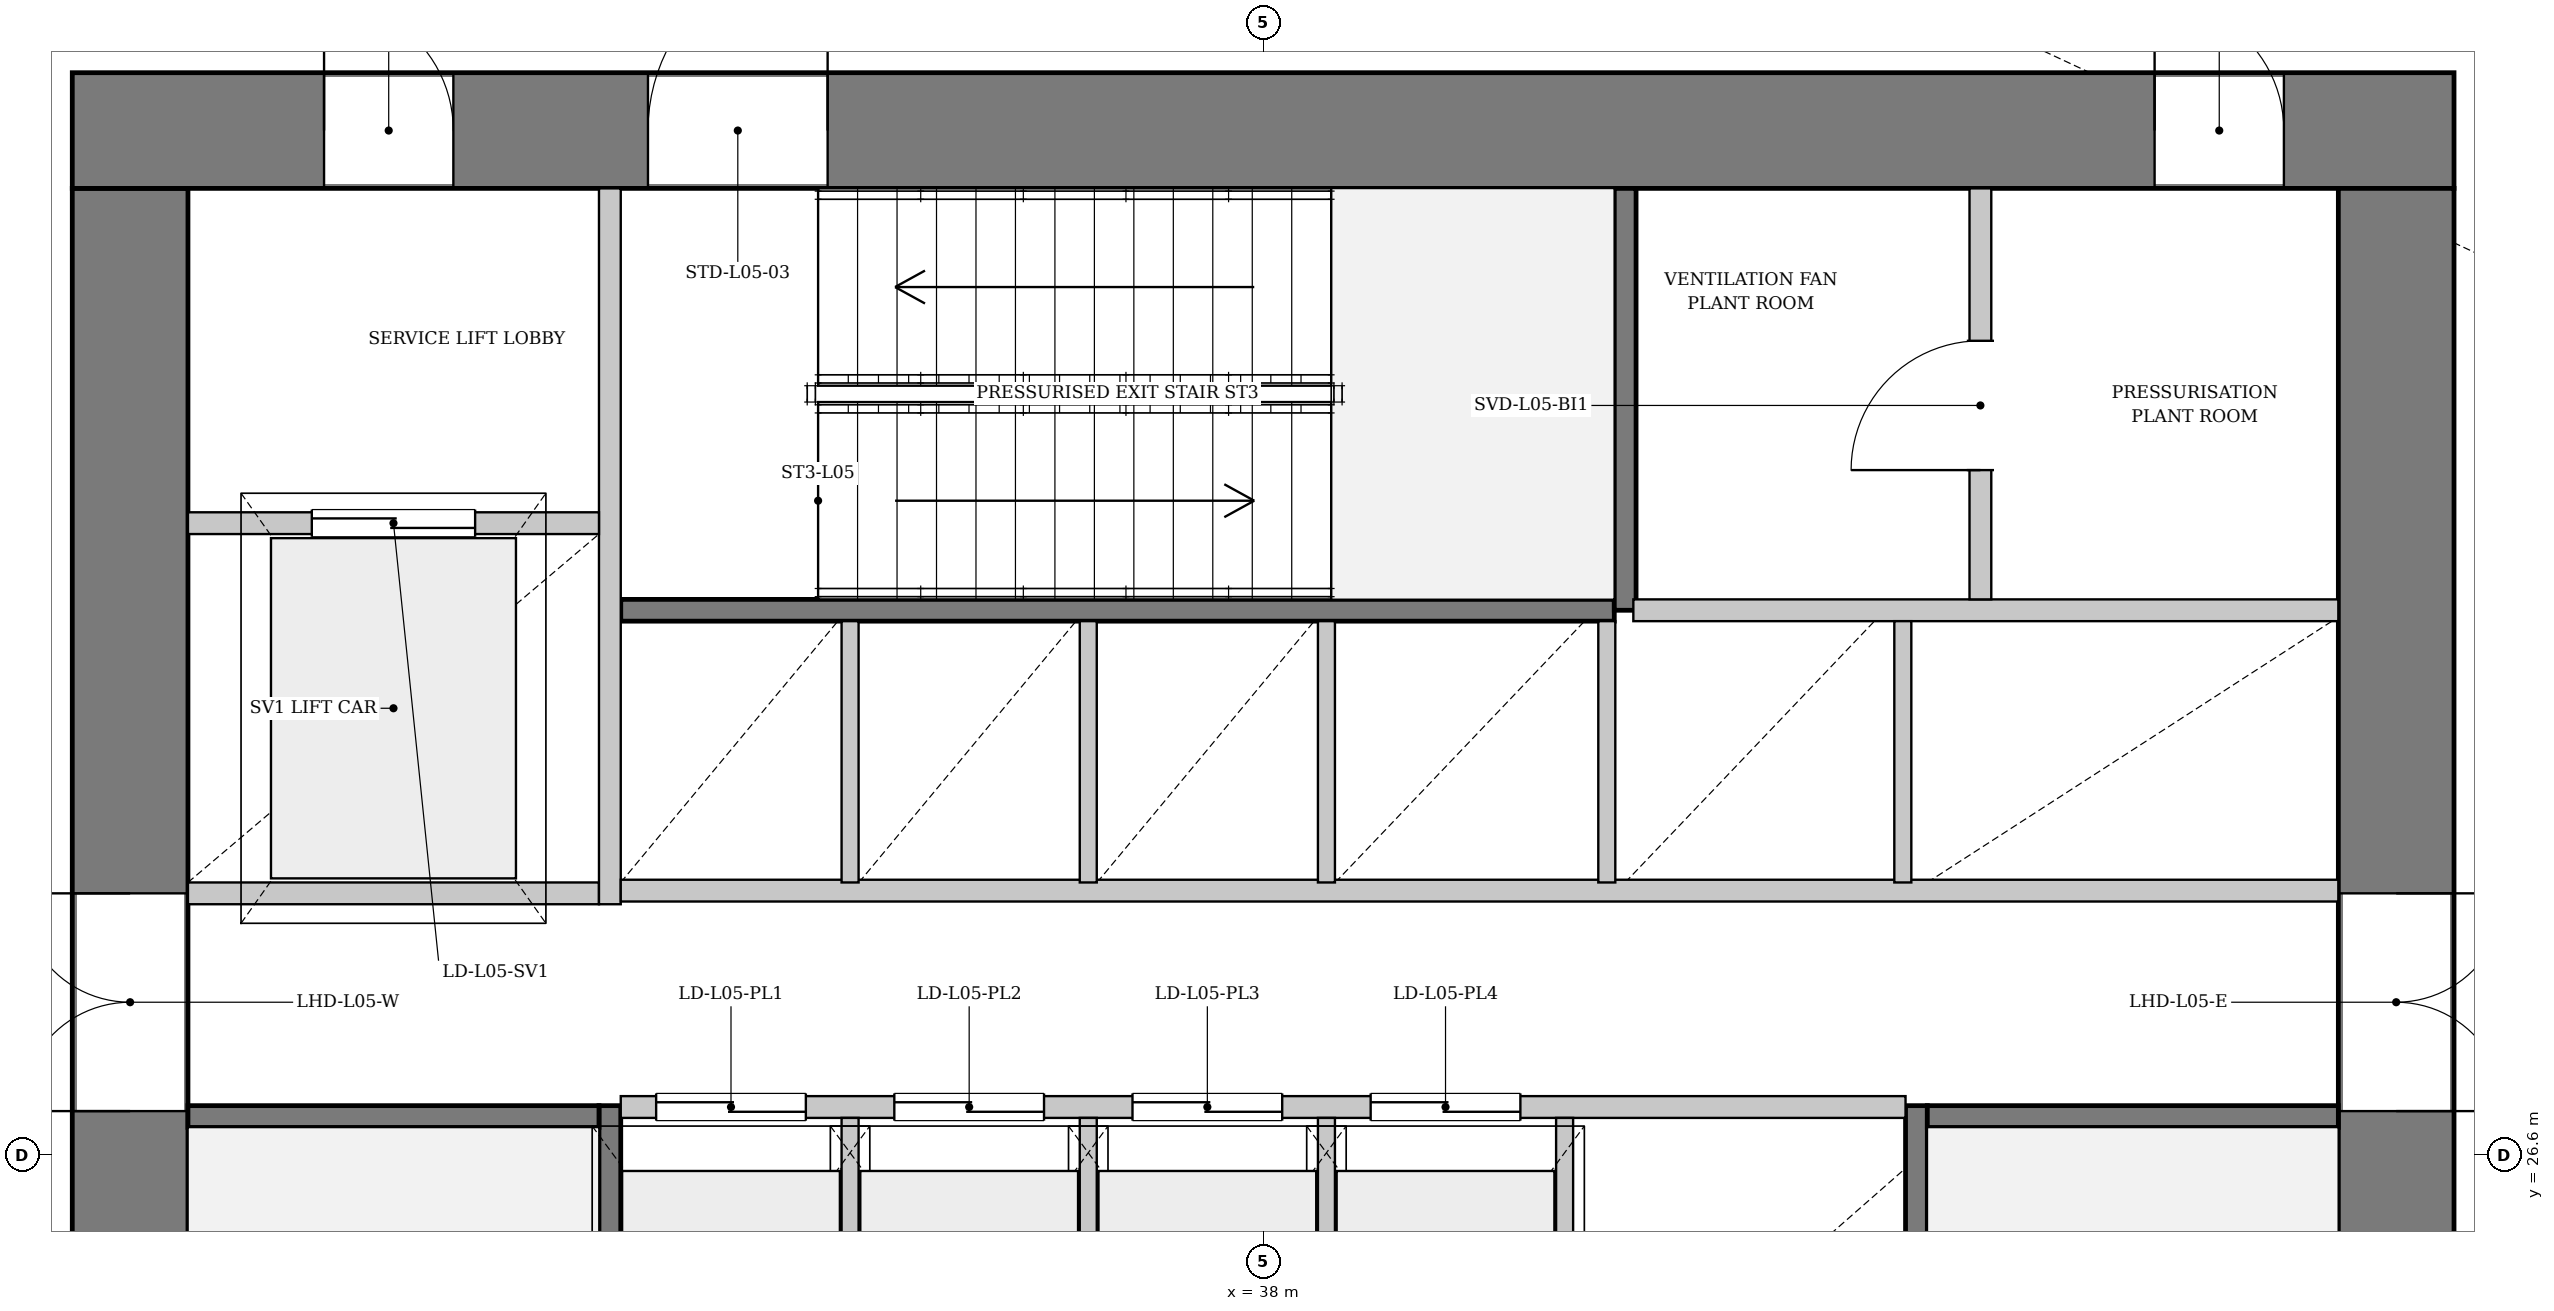
"""IFC4 building model, lengths in metres.
Left out: names, types, materials, properties, quantities, classifications, styles, units other than length and angle.
Written with IfcOpenShell. Run it as: python <this file> out.ifc"""

import sys

from ifc_helpers import new_model, si_unit, direction, frame, frame_2d, origin, place, context, subcontext, project, spatial, rectangle, extrude, source, transform, mapped, element, fill, save


model = new_model("IFC4")
c1 = context("Model", 3, precision=1e-05, world=origin(), true_north=direction((0.0, 1.0)))
c2 = subcontext(c1, "Body", "Model", "MODEL_VIEW")
j1 = project(units=[si_unit("LENGTHUNIT", "METRE"), si_unit("PLANEANGLEUNIT", "RADIAN")], contexts=[c1])
p1 = place(None, origin())
s1 = spatial("IfcSite", under=j1, at=p1, CompositionType="ELEMENT")
p2 = place(p1, origin())
s2 = spatial("IfcBuilding", under=s1, at=p2, CompositionType="ELEMENT")
p3 = place(p2, frame((0.0, 0.0, 24.6)))
s3 = spatial("IfcBuildingStorey", under=s2, at=p3, CompositionType="ELEMENT", Elevation=24.6)
p4 = place(p3, frame((29.675, 19.5, 0.0), z_axis=(0.0, 0.0, 1.0), x_axis=(0.0, 1.0, 0.0)))
e1 = element("IfcWall", 1, at=p4, inside=s3, PredefinedType="SHEAR", context=c2, shape_type="SweptSolid", body=[
    extrude(rectangle(XDim=14.2, YDim=0.85, at=frame_2d((7.1, 0.0))), origin(), (0.0, 0.0, 1.0), 4.45),
])
p5 = place(p4, frame((7.42, 0.0, 0.0)))
e2 = element("IfcOpeningElement", 2, at=p5, cuts=e1, PredefinedType="OPENING", context=c2, shape_type="SweptSolid", body=[
    extrude(rectangle(XDim=1.6, YDim=2.2, at=frame_2d((0.8, 1.1))), frame((0.0, 0.435, 0.0), z_axis=(0.0, -1.0, 0.0), x_axis=(1.0, 0.0, 0.0)), (0.0, 0.0, 1.0), 0.87),
])
p6 = place(p3, frame((29.25, 34.125, 0.0), z_axis=(0.0, 0.0, 1.0), x_axis=(1.0, 0.0, 0.0)))
e3 = element("IfcWall", 3, at=p6, inside=s3, PredefinedType="SHEAR", context=c2, shape_type="SweptSolid", body=[
    extrude(rectangle(XDim=17.5, YDim=0.85, at=frame_2d((8.75, 0.0))), origin(), (0.0, 0.0, 1.0), 4.45),
])
p7 = place(p6, frame((1.85, 0.0, 0.0)))
e4 = element("IfcOpeningElement", 4, at=p7, cuts=e3, PredefinedType="OPENING", context=c2, shape_type="SweptSolid", body=[
    extrude(rectangle(XDim=0.95, YDim=2.1, at=frame_2d((0.475, 1.05))), frame((0.0, 0.435, 0.0), z_axis=(0.0, -1.0, 0.0), x_axis=(1.0, 0.0, 0.0)), (0.0, 0.0, 1.0), 0.87),
])
p8 = place(p6, frame((4.23, 0.0, 0.0)))
e5 = element("IfcOpeningElement", 5, at=p8, cuts=e3, PredefinedType="OPENING", context=c2, shape_type="SweptSolid", body=[
    extrude(rectangle(XDim=1.32, YDim=2.2, at=frame_2d((0.66, 1.1))), frame((0.0, 0.435, 0.0), z_axis=(0.0, -1.0, 0.0), x_axis=(1.0, 0.0, 0.0)), (0.0, 0.0, 1.0), 0.87),
])
p9 = place(p6, frame((15.3, 0.0, 0.0)))
e6 = element("IfcOpeningElement", 6, at=p9, cuts=e3, PredefinedType="OPENING", context=c2, shape_type="SweptSolid", body=[
    extrude(rectangle(XDim=0.95, YDim=2.1, at=frame_2d((0.475, 1.05))), frame((0.0, 0.435, 0.0), z_axis=(0.0, -1.0, 0.0), x_axis=(1.0, 0.0, 0.0)), (0.0, 0.0, 1.0), 0.87),
])
p10 = place(p3, frame((46.325, 33.7, 0.0), z_axis=(0.0, 0.0, 1.0), x_axis=(0.0, -1.0, 0.0)))
e7 = element("IfcWall", 7, at=p10, inside=s3, PredefinedType="SHEAR", context=c2, shape_type="SweptSolid", body=[
    extrude(rectangle(XDim=14.2, YDim=0.85, at=frame_2d((7.1, 0.0))), origin(), (0.0, 0.0, 1.0), 4.45),
])
p11 = place(p10, frame((5.18, 0.0, 0.0)))
e8 = element("IfcOpeningElement", 8, at=p11, cuts=e7, PredefinedType="OPENING", context=c2, shape_type="SweptSolid", body=[
    extrude(rectangle(XDim=1.6, YDim=2.2, at=frame_2d((0.8, 1.1))), frame((0.0, 0.435, 0.0), z_axis=(0.0, -1.0, 0.0), x_axis=(1.0, 0.0, 0.0)), (0.0, 0.0, 1.0), 0.87),
])
p12 = place(p3, frame((33.2, 19.5, 0.0), z_axis=(0.0, 0.0, 1.0), x_axis=(0.0, 1.0, 0.0)))
e9 = element("IfcWall", 9, at=p12, inside=s3, PredefinedType="PARTITIONING", context=c2, shape_type="SweptSolid", body=[
    extrude(rectangle(XDim=7.46, YDim=0.16, at=frame_2d((3.73, 0.0))), origin(), (0.0, 0.0, 1.0), 4.45),
])
p13 = place(p12, frame((0.08, 0.0, 0.0)))
e10 = element("IfcOpeningElement", 10, at=p13, cuts=e9, PredefinedType="OPENING", context=c2, shape_type="SweptSolid", body=[
    extrude(rectangle(XDim=1.32, YDim=2.2, at=frame_2d((0.66, 1.1))), frame((0.0, 0.09, 0.0), z_axis=(0.0, -1.0, 0.0), x_axis=(1.0, 0.0, 0.0)), (0.0, 0.0, 1.0), 0.18),
])
p14 = place(p3, frame((30.1, 26.88, 0.0), z_axis=(0.0, 0.0, 1.0), x_axis=(1.0, 0.0, 0.0)))
e11 = element("IfcWall", 11, at=p14, inside=s3, PredefinedType="PARTITIONING", context=c2, shape_type="SweptSolid", body=[
    extrude(rectangle(XDim=3.02, YDim=0.16, at=frame_2d((1.51, 0.0))), origin(), (0.0, 0.0, 1.0), 4.45),
])
p15 = place(p3, frame((42.8, 26.96, 0.0), z_axis=(0.0, 0.0, 1.0), x_axis=(0.0, -1.0, 0.0)))
e12 = element("IfcWall", 12, at=p15, inside=s3, PredefinedType="PARTITIONING", context=c2, shape_type="SweptSolid", body=[
    extrude(rectangle(XDim=7.46, YDim=0.16, at=frame_2d((3.73, 0.0))), origin(), (0.0, 0.0, 1.0), 4.45),
])
p16 = place(p15, frame((6.06, 0.0, 0.0)))
e13 = element("IfcOpeningElement", 13, at=p16, cuts=e12, PredefinedType="OPENING", context=c2, shape_type="SweptSolid", body=[
    extrude(rectangle(XDim=1.32, YDim=2.2, at=frame_2d((0.66, 1.1))), frame((0.0, 0.09, 0.0), z_axis=(0.0, -1.0, 0.0), x_axis=(1.0, 0.0, 0.0)), (0.0, 0.0, 1.0), 0.18),
])
p17 = place(p3, frame((42.88, 26.88, 0.0), z_axis=(0.0, 0.0, 1.0), x_axis=(1.0, 0.0, 0.0)))
e14 = element("IfcWall", 14, at=p17, inside=s3, PredefinedType="PARTITIONING", context=c2, shape_type="SweptSolid", body=[
    extrude(rectangle(XDim=3.02, YDim=0.16, at=frame_2d((1.51, 0.0))), origin(), (0.0, 0.0, 1.0), 4.45),
])
p18 = place(p3, frame((33.28, 30.6, 0.0), z_axis=(0.0, 0.0, 1.0), x_axis=(1.0, 0.0, 0.0)))
e15 = element("IfcWall", 15, at=p18, inside=s3, PredefinedType="PARTITIONING", context=c2, shape_type="SweptSolid", body=[
    extrude(rectangle(XDim=7.3, YDim=0.16, at=frame_2d((3.65, 0.0))), origin(), (0.0, 0.0, 1.0), 4.45),
])
p19 = place(p3, frame((40.66, 30.6, 0.0), z_axis=(0.0, 0.0, 1.0), x_axis=(0.0, 1.0, 0.0)))
e16 = element("IfcWall", 16, at=p19, inside=s3, PredefinedType="PARTITIONING", context=c2, shape_type="SweptSolid", body=[
    extrude(rectangle(XDim=3.1, YDim=0.16, at=frame_2d((1.55, 0.0))), origin(), (0.0, 0.0, 1.0), 4.45),
])
p20 = place(p3, frame((30.1, 28.52, 0.0), z_axis=(0.0, 0.0, 1.0), x_axis=(1.0, 0.0, 0.0)))
e17 = element("IfcWall", 17, at=p20, inside=s3, PredefinedType="PARTITIONING", context=c2, shape_type="SweptSolid", body=[
    extrude(rectangle(XDim=3.02, YDim=0.16, at=frame_2d((1.51, 0.0))), origin(), (0.0, 0.0, 1.0), 4.45),
])
p21 = place(p3, frame((33.2, 28.44, 0.0), z_axis=(0.0, 0.0, 1.0), x_axis=(0.0, 1.0, 0.0)))
e18 = element("IfcWall", 18, at=p21, inside=s3, PredefinedType="PARTITIONING", context=c2, shape_type="SweptSolid", body=[
    extrude(rectangle(XDim=5.26, YDim=0.16, at=frame_2d((2.63, 0.0))), origin(), (0.0, 0.0, 1.0), 4.45),
])
p22 = place(p3, frame((30.1, 31.24, 0.0), z_axis=(0.0, 0.0, 1.0), x_axis=(1.0, 0.0, 0.0)))
e19 = element("IfcWall", 19, at=p22, inside=s3, PredefinedType="PARTITIONING", context=c2, shape_type="SweptSolid", body=[
    extrude(rectangle(XDim=3.02, YDim=0.16, at=frame_2d((1.51, 0.0))), origin(), (0.0, 0.0, 1.0), 4.45),
])
p23 = place(p22, frame((0.91, 0.0, 0.0)))
e20 = element("IfcOpeningElement", 20, at=p23, cuts=e19, PredefinedType="OPENING", context=c2, shape_type="SweptSolid", body=[
    extrude(rectangle(XDim=1.2, YDim=2.2, at=frame_2d((0.6, 1.1))), frame((0.0, 0.09, 0.0), z_axis=(0.0, -1.0, 0.0), x_axis=(1.0, 0.0, 0.0)), (0.0, 0.0, 1.0), 0.18),
])
p24 = place(p3, frame((33.28, 26.95, 0.0), z_axis=(0.0, 0.0, 1.0), x_axis=(1.0, 0.0, 0.0)))
e21 = element("IfcWall", 21, at=p24, inside=s3, PredefinedType="PARTITIONING", context=c2, shape_type="SweptSolid", body=[
    extrude(rectangle(XDim=9.44, YDim=0.16, at=frame_2d((4.72, 0.0))), origin(), (0.0, 0.0, 1.0), 4.45),
])
p25 = place(p24, frame((0.26, 0.0, 0.0)))
e22 = element("IfcOpeningElement", 22, at=p25, cuts=e21, PredefinedType="OPENING", context=c2, shape_type="SweptSolid", body=[
    extrude(rectangle(XDim=1.1, YDim=2.2, at=frame_2d((0.55, 1.1))), frame((0.0, 0.09, 0.0), z_axis=(0.0, -1.0, 0.0), x_axis=(1.0, 0.0, 0.0)), (0.0, 0.0, 1.0), 0.18),
])
p26 = place(p24, frame((2.01, 0.0, 0.0)))
e23 = element("IfcOpeningElement", 23, at=p26, cuts=e21, PredefinedType="OPENING", context=c2, shape_type="SweptSolid", body=[
    extrude(rectangle(XDim=1.1, YDim=2.2, at=frame_2d((0.55, 1.1))), frame((0.0, 0.09, 0.0), z_axis=(0.0, -1.0, 0.0), x_axis=(1.0, 0.0, 0.0)), (0.0, 0.0, 1.0), 0.18),
])
p27 = place(p24, frame((3.76, 0.0, 0.0)))
e24 = element("IfcOpeningElement", 24, at=p27, cuts=e21, PredefinedType="OPENING", context=c2, shape_type="SweptSolid", body=[
    extrude(rectangle(XDim=1.1, YDim=2.2, at=frame_2d((0.55, 1.1))), frame((0.0, 0.09, 0.0), z_axis=(0.0, -1.0, 0.0), x_axis=(1.0, 0.0, 0.0)), (0.0, 0.0, 1.0), 0.18),
])
p28 = place(p24, frame((5.51, 0.0, 0.0)))
e25 = element("IfcOpeningElement", 25, at=p28, cuts=e21, PredefinedType="OPENING", context=c2, shape_type="SweptSolid", body=[
    extrude(rectangle(XDim=1.1, YDim=2.2, at=frame_2d((0.55, 1.1))), frame((0.0, 0.09, 0.0), z_axis=(0.0, -1.0, 0.0), x_axis=(1.0, 0.0, 0.0)), (0.0, 0.0, 1.0), 0.18),
])
for number, where, z_axis, x_axis in (
    (26, (34.965, 24.56, 0.0), (0.0, 0.0, 1.0), (0.0, 1.0, 0.0)),
    (27, (36.715, 24.56, 0.0), (0.0, 0.0, 1.0), (0.0, 1.0, 0.0)),
    (28, (38.465, 24.56, 0.0), (0.0, 0.0, 1.0), (0.0, 1.0, 0.0)),
    (29, (40.215, 24.56, 0.0), (0.0, 0.0, 1.0), (0.0, 1.0, 0.0)),
):
    element("IfcWall", number, at=place(p3, frame(where, z_axis=z_axis, x_axis=x_axis)), inside=s3, PredefinedType="PARTITIONING", context=c2, shape_type="SweptSolid", body=[
        extrude(rectangle(XDim=2.31, YDim=0.125, at=frame_2d((1.155, 0.0))), origin(), (0.0, 0.0, 1.0), 4.45),
    ])
p29 = place(p3, frame((33.28, 28.54, 0.0), z_axis=(0.0, 0.0, 1.0), x_axis=(1.0, 0.0, 0.0)))
e30 = element("IfcWall", 30, at=p29, inside=s3, PredefinedType="PARTITIONING", context=c2, shape_type="SweptSolid", body=[
    extrude(rectangle(XDim=12.62, YDim=0.16, at=frame_2d((6.31, 0.0))), origin(), (0.0, 0.0, 1.0), 4.45),
])
p30 = place(p3, frame((40.72, 30.6, 0.0), z_axis=(0.0, 0.0, 1.0), x_axis=(1.0, 0.0, 0.0)))
e31 = element("IfcWall", 31, at=p30, inside=s3, PredefinedType="PARTITIONING", context=c2, shape_type="SweptSolid", body=[
    extrude(rectangle(XDim=5.18, YDim=0.16, at=frame_2d((2.59, 0.0))), origin(), (0.0, 0.0, 1.0), 4.45),
])
for number, where, z_axis, x_axis in (
    (32, (34.965, 28.6, 0.0), (0.0, 0.0, 1.0), (0.0, 1.0, 0.0)),
    (33, (36.715, 28.6, 0.0), (0.0, 0.0, 1.0), (0.0, 1.0, 0.0)),
    (34, (38.465, 28.6, 0.0), (0.0, 0.0, 1.0), (0.0, 1.0, 0.0)),
    (35, (40.525, 28.6, 0.0), (0.0, 0.0, 1.0), (0.0, 1.0, 0.0)),
    (36, (42.7, 28.6, 0.0), (0.0, 0.0, 1.0), (0.0, 1.0, 0.0)),
):
    element("IfcWall", number, at=place(p3, frame(where, z_axis=z_axis, x_axis=x_axis)), inside=s3, PredefinedType="PARTITIONING", context=c2, shape_type="SweptSolid", body=[
        extrude(rectangle(XDim=1.92, YDim=0.125, at=frame_2d((0.96, 0.0))), origin(), (0.0, 0.0, 1.0), 4.45),
    ])
p31 = place(p3, frame((43.27, 30.68, 0.0), z_axis=(0.0, 0.0, 1.0), x_axis=(0.0, 1.0, 0.0)))
e37 = element("IfcWall", 37, at=p31, inside=s3, PredefinedType="PARTITIONING", context=c2, shape_type="SweptSolid", body=[
    extrude(rectangle(XDim=3.02, YDim=0.16, at=frame_2d((1.51, 0.0))), origin(), (0.0, 0.0, 1.0), 4.45),
])
p32 = place(p31, frame((0.95, 0.0, 0.0)))
e38 = element("IfcOpeningElement", 38, at=p32, cuts=e37, PredefinedType="OPENING", context=c2, shape_type="SweptSolid", body=[
    extrude(rectangle(XDim=0.95, YDim=2.1, at=frame_2d((0.475, 1.05))), frame((0.0, 0.09, 0.0), z_axis=(0.0, -1.0, 0.0), x_axis=(1.0, 0.0, 0.0)), (0.0, 0.0, 1.0), 0.18),
])
m1 = source(origin(), c2, "Body", "SweptSolid", [
    extrude(rectangle(XDim=1.6, YDim=2.2, at=frame_2d((0.8, 1.1))), frame((0.0, 0.025, 0.0), z_axis=(0.0, -1.0, 0.0), x_axis=(1.0, 0.0, 0.0)), (0.0, 0.0, 1.0), 0.05),
])
p33 = place(p5, origin())
e39 = element("IfcDoor", 39, at=p33, inside=s3, OperationType="DOUBLE_DOOR_SINGLE_SWING", PredefinedType="DOOR", context=c2, shape_type="MappedRepresentation", body=[
    mapped(m1, transform((0.0, 0.0, 0.0), x_axis=(1.0, 0.0, 0.0), y_axis=(0.0, 1.0, 0.0), z_axis=(0.0, 0.0, 1.0), scale=1.0)),
])
fill(e2, e39)
m2 = source(origin(), c2, "Body", "SweptSolid", [
    extrude(rectangle(XDim=0.95, YDim=2.1, at=frame_2d((0.475, 1.05))), frame((0.0, 0.025, 0.0), z_axis=(0.0, -1.0, 0.0), x_axis=(1.0, 0.0, 0.0)), (0.0, 0.0, 1.0), 0.05),
])
p34 = place(p7, origin())
e40 = element("IfcDoor", 40, at=p34, inside=s3, OperationType="SINGLE_SWING_LEFT", PredefinedType="DOOR", context=c2, shape_type="MappedRepresentation", body=[
    mapped(m2, transform((0.0, 0.0, 0.0), x_axis=(1.0, 0.0, 0.0), y_axis=(0.0, 1.0, 0.0), z_axis=(0.0, 0.0, 1.0), scale=1.0)),
])
fill(e4, e40)
m3 = source(origin(), c2, "Body", "SweptSolid", [
    extrude(rectangle(XDim=1.32, YDim=2.2, at=frame_2d((0.66, 1.1))), frame((0.0, 0.025, 0.0), z_axis=(0.0, -1.0, 0.0), x_axis=(1.0, 0.0, 0.0)), (0.0, 0.0, 1.0), 0.05),
])
p35 = place(p8, origin())
e41 = element("IfcDoor", 41, at=p35, inside=s3, OperationType="SINGLE_SWING_RIGHT", PredefinedType="DOOR", context=c2, shape_type="MappedRepresentation", body=[
    mapped(m3, transform((0.0, 0.0, 0.0), x_axis=(1.0, 0.0, 0.0), y_axis=(0.0, 1.0, 0.0), z_axis=(0.0, 0.0, 1.0), scale=1.0)),
])
fill(e5, e41)
p36 = place(p11, origin())
e42 = element("IfcDoor", 42, at=p36, inside=s3, OperationType="DOUBLE_DOOR_SINGLE_SWING", PredefinedType="DOOR", context=c2, shape_type="MappedRepresentation", body=[
    mapped(m1, transform((0.0, 0.0, 0.0), x_axis=(1.0, 0.0, 0.0), y_axis=(0.0, 1.0, 0.0), z_axis=(0.0, 0.0, 1.0), scale=1.0)),
])
fill(e8, e42)
m4 = source(origin(), c2, "Body", "SweptSolid", [
    extrude(rectangle(XDim=1.2, YDim=2.2, at=frame_2d((0.6, 1.1))), frame((0.0, 0.025, 0.0), z_axis=(0.0, -1.0, 0.0), x_axis=(1.0, 0.0, 0.0)), (0.0, 0.0, 1.0), 0.05),
])
p37 = place(p23, origin())
e43 = element("IfcDoor", 43, at=p37, inside=s3, OperationType="DOUBLE_DOOR_SLIDING", PredefinedType="DOOR", context=c2, shape_type="MappedRepresentation", body=[
    mapped(m4, transform((0.0, 0.0, 0.0), x_axis=(1.0, 0.0, 0.0), y_axis=(0.0, 1.0, 0.0), z_axis=(0.0, 0.0, 1.0), scale=1.0)),
])
fill(e20, e43)
m5 = source(origin(), c2, "Body", "SweptSolid", [
    extrude(rectangle(XDim=1.1, YDim=2.2, at=frame_2d((0.55, 1.1))), frame((0.0, 0.025, 0.0), z_axis=(0.0, -1.0, 0.0), x_axis=(1.0, 0.0, 0.0)), (0.0, 0.0, 1.0), 0.05),
])
p38 = place(p25, origin())
e44 = element("IfcDoor", 44, at=p38, inside=s3, OperationType="DOUBLE_DOOR_SLIDING", PredefinedType="DOOR", context=c2, shape_type="MappedRepresentation", body=[
    mapped(m5, transform((0.0, 0.0, 0.0), x_axis=(1.0, 0.0, 0.0), y_axis=(0.0, 1.0, 0.0), z_axis=(0.0, 0.0, 1.0), scale=1.0)),
])
fill(e22, e44)
p39 = place(p26, origin())
e45 = element("IfcDoor", 45, at=p39, inside=s3, OperationType="DOUBLE_DOOR_SLIDING", PredefinedType="DOOR", context=c2, shape_type="MappedRepresentation", body=[
    mapped(m5, transform((0.0, 0.0, 0.0), x_axis=(1.0, 0.0, 0.0), y_axis=(0.0, 1.0, 0.0), z_axis=(0.0, 0.0, 1.0), scale=1.0)),
])
fill(e23, e45)
p40 = place(p27, origin())
e46 = element("IfcDoor", 46, at=p40, inside=s3, OperationType="DOUBLE_DOOR_SLIDING", PredefinedType="DOOR", context=c2, shape_type="MappedRepresentation", body=[
    mapped(m5, transform((0.0, 0.0, 0.0), x_axis=(1.0, 0.0, 0.0), y_axis=(0.0, 1.0, 0.0), z_axis=(0.0, 0.0, 1.0), scale=1.0)),
])
fill(e24, e46)
p41 = place(p28, origin())
e47 = element("IfcDoor", 47, at=p41, inside=s3, OperationType="DOUBLE_DOOR_SLIDING", PredefinedType="DOOR", context=c2, shape_type="MappedRepresentation", body=[
    mapped(m5, transform((0.0, 0.0, 0.0), x_axis=(1.0, 0.0, 0.0), y_axis=(0.0, 1.0, 0.0), z_axis=(0.0, 0.0, 1.0), scale=1.0)),
])
fill(e25, e47)
p42 = place(p32, origin())
e48 = element("IfcDoor", 48, at=p42, inside=s3, OperationType="SINGLE_SWING_LEFT", PredefinedType="DOOR", context=c2, shape_type="MappedRepresentation", body=[
    mapped(m2, transform((0.0, 0.0, 0.0), x_axis=(1.0, 0.0, 0.0), y_axis=(0.0, 1.0, 0.0), z_axis=(0.0, 0.0, 1.0), scale=1.0)),
])
fill(e38, e48)
p43 = place(p9, origin())
e49 = element("IfcDoor", 49, at=p43, inside=s3, OperationType="SINGLE_SWING_LEFT", PredefinedType="DOOR", context=c2, shape_type="MappedRepresentation", body=[
    mapped(m2, transform((0.0, 0.0, 0.0), x_axis=(1.0, 0.0, 0.0), y_axis=(0.0, 1.0, 0.0), z_axis=(0.0, 0.0, 1.0), scale=1.0)),
])
fill(e6, e49)
save(model, sys.argv[1])
